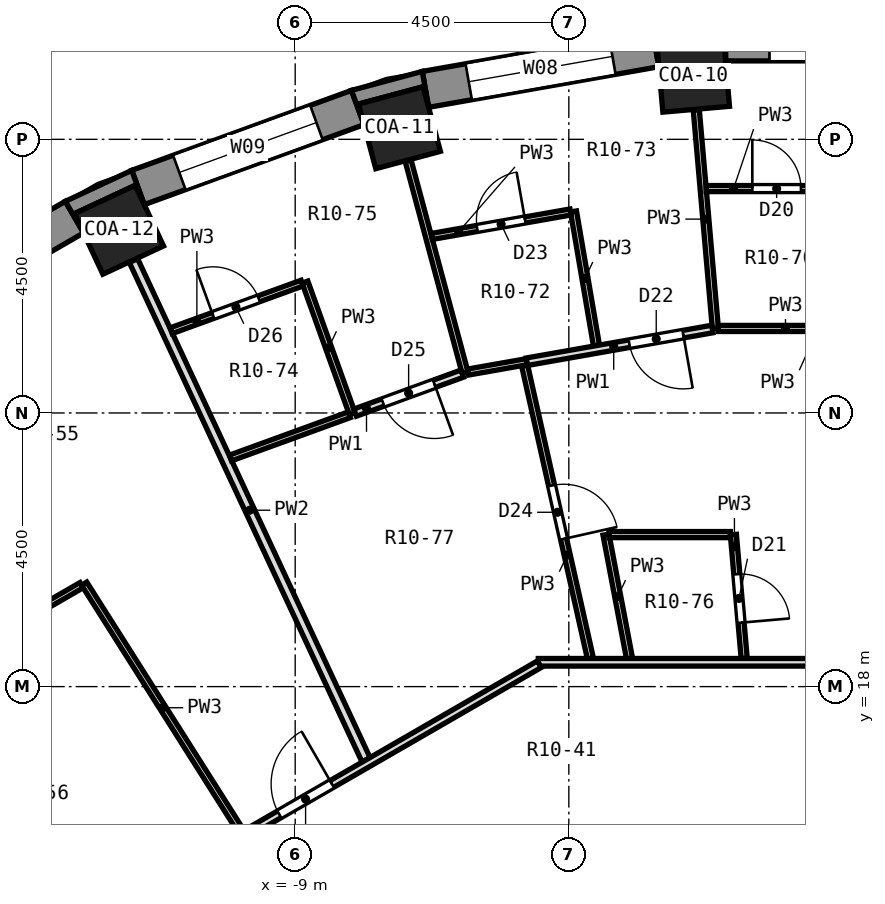
"""IFC4 building model, lengths in metres.
Left out: names, types, materials, properties, quantities, classifications, styles, units other than length and angle.
Written with IfcOpenShell. Run it as: python <this file> out.ifc"""

import sys

from ifc_helpers import new_model, si_unit, direction, frame, frame_2d, origin, origin_2d, place, context, subcontext, project, spatial, polyline, rectangle, outline, extrude, element, fill, save


model = new_model("IFC4")
c1 = context("Model", 3, precision=1e-05, world=origin(), true_north=direction((0.0, 1.0)))
c2 = subcontext(c1, "Body", "Model", "MODEL_VIEW")
j1 = project(units=[si_unit("LENGTHUNIT", "METRE"), si_unit("PLANEANGLEUNIT", "RADIAN")], contexts=[c1])
p1 = place(None, origin())
s1 = spatial("IfcSite", under=j1, at=p1, CompositionType="ELEMENT")
p2 = place(p1, origin())
s2 = spatial("IfcBuilding", under=s1, at=p2, CompositionType="ELEMENT")
p3 = place(p2, frame((0.0, 0.0, 36.2)))
s3 = spatial("IfcBuildingStorey", under=s2, at=p3, CompositionType="ELEMENT", Elevation=36.2)
for number, where, z_axis, x_axis in (
    (1, (-2.453, 28.043, 0.0), (0.0, 0.0, 1.0), (-0.087, 0.996, 0.0)),
    (2, (-7.286, 27.191, 0.0), (0.0, 0.0, 1.0), (-0.259, 0.966, 0.0)),
    (3, (-11.897, 25.512, 0.0), (0.0, 0.0, 1.0), (-0.423, 0.906, 0.0)),
):
    element("IfcColumn", number, at=place(p3, frame(where, z_axis=z_axis, x_axis=x_axis)), inside=s3, PredefinedType="COLUMN", context=c2, shape_type="SweptSolid", body=[
        extrude(rectangle(XDim=1.1, YDim=1.1, at=origin_2d()), origin(), (0.0, 0.0, 1.0), 3.3),
    ])
p4 = place(p3, frame((1.923, 28.59, 0.0), z_axis=(0.0, 0.0, 1.0), x_axis=(-1.0, 0.0, 0.0)))
e4 = element("IfcWall", 4, at=p4, inside=s3, PredefinedType="SOLIDWALL", context=c2, shape_type="SweptSolid", body=[
    extrude(rectangle(XDim=3.846, YDim=0.6, at=frame_2d((1.923, 0.0))), origin(), (0.0, 0.0, 1.0), 2.75),
])
p5 = place(p4, frame((0.723, 0.0, 0.9)))
e5 = element("IfcOpeningElement", 5, at=p5, cuts=e4, PredefinedType="OPENING", context=c2, shape_type="SweptSolid", body=[
    extrude(rectangle(XDim=2.4, YDim=1.8, at=frame_2d((1.2, 0.9))), frame((0.0, 0.312, 0.0), z_axis=(0.0, -1.0, 0.0), x_axis=(1.0, 0.0, 0.0)), (0.0, 0.0, 1.0), 0.624),
])
p6 = place(p3, frame((-3.071, 28.489, 0.0), z_axis=(0.0, 0.0, 1.0), x_axis=(-0.984800809218, -0.173687553279, 0.0)))
e6 = element("IfcWall", 6, at=p6, inside=s3, PredefinedType="SOLIDWALL", context=c2, shape_type="SweptSolid", body=[
    extrude(rectangle(XDim=3.846, YDim=0.6, at=frame_2d((1.923, 0.0))), origin(), (0.0, 0.0, 1.0), 2.75),
])
p7 = place(p6, frame((0.723, 0.0, 0.9)))
e7 = element("IfcOpeningElement", 7, at=p7, cuts=e6, PredefinedType="OPENING", context=c2, shape_type="SweptSolid", body=[
    extrude(rectangle(XDim=2.4, YDim=1.8, at=frame_2d((1.2, 0.9))), frame((0.0, 0.312, 0.0), z_axis=(0.0, -1.0, 0.0), x_axis=(1.0, 0.0, 0.0)), (0.0, 0.0, 1.0), 0.624),
])
p8 = place(p3, frame((-7.971, 27.523, 0.0), z_axis=(0.0, 0.0, 1.0), x_axis=(-0.939689588564, -0.342028474173, 0.0)))
e8 = element("IfcWall", 8, at=p8, inside=s3, PredefinedType="SOLIDWALL", context=c2, shape_type="SweptSolid", body=[
    extrude(rectangle(XDim=3.846, YDim=0.6, at=frame_2d((1.923, 0.0))), origin(), (0.0, 0.0, 1.0), 2.75),
])
p9 = place(p8, frame((0.723, 0.0, 0.9)))
e9 = element("IfcOpeningElement", 9, at=p9, cuts=e8, PredefinedType="OPENING", context=c2, shape_type="SweptSolid", body=[
    extrude(rectangle(XDim=2.4, YDim=1.8, at=frame_2d((1.2, 0.9))), frame((0.0, 0.312, 0.0), z_axis=(0.0, -1.0, 0.0), x_axis=(1.0, 0.0, 0.0)), (0.0, 0.0, 1.0), 0.624),
])
p10 = place(p3, frame((-12.63, 25.721, 0.0), z_axis=(0.0, 0.0, 1.0), x_axis=(-0.86603124159, -0.499989888488, 0.0)))
e10 = element("IfcWall", 10, at=p10, inside=s3, PredefinedType="SOLIDWALL", context=c2, shape_type="SweptSolid", body=[
    extrude(rectangle(XDim=3.846, YDim=0.6, at=frame_2d((1.923, 0.0))), origin(), (0.0, 0.0, 1.0), 2.75),
])
p11 = place(p10, frame((0.723, 0.0, 0.9)))
e11 = element("IfcOpeningElement", 11, at=p11, cuts=e10, PredefinedType="OPENING", context=c2, shape_type="SweptSolid", body=[
    extrude(rectangle(XDim=2.4, YDim=1.8, at=frame_2d((1.2, 0.9))), frame((0.0, 0.312, 0.0), z_axis=(0.0, -1.0, 0.0), x_axis=(1.0, 0.0, 0.0)), (0.0, 0.0, 1.0), 0.624),
])
p12 = place(p3, origin())
e12 = element("IfcWall", 12, at=p12, inside=s3, PredefinedType="SOLIDWALL", context=c2, shape_type="SweptSolid", body=[
    extrude(outline(polyline([(-1.923, 28.89), (-3.123, 28.785), (-3.019, 28.194), (-3.049, 28.543), (-1.954, 28.639), (-1.923, 28.29), (-1.923, 28.89)])), origin(), (0.0, 0.0, 1.0), 2.75),
])
p13 = place(p3, origin())
e13 = element("IfcWall", 13, at=p13, inside=s3, PredefinedType="SOLIDWALL", context=c2, shape_type="SweptSolid", body=[
    extrude(outline(polyline([(-6.91, 28.117), (-8.074, 27.805), (-7.869, 27.241), (-7.959, 27.58), (-6.897, 27.865), (-6.806, 27.526), (-6.91, 28.117)])), origin(), (0.0, 0.0, 1.0), 2.75),
])
p14 = place(p3, origin())
e14 = element("IfcWall", 14, at=p14, inside=s3, PredefinedType="SOLIDWALL", context=c2, shape_type="SweptSolid", body=[
    extrude(outline(polyline([(-12.78, 25.981), (-12.479, 25.461), (-12.628, 25.779), (-11.631, 26.243), (-11.483, 25.926), (-11.688, 26.49), (-12.78, 25.981)])), origin(), (0.0, 0.0, 1.0), 2.75),
])
p15 = place(p3, frame((-2.404, 27.485, 0.0), z_axis=(0.0, 0.0, 1.0), x_axis=(0.08706456859, -0.996202670593, 0.0)))
e15 = element("IfcWall", 15, at=p15, inside=s3, PredefinedType="PARTITIONING", context=c2, shape_type="SweptSolid", body=[
    extrude(rectangle(XDim=3.609, YDim=0.1, at=frame_2d((1.804, 0.0))), origin(), (0.0, 0.0, 1.0), 2.75),
])
p16 = place(p3, frame((-1.794, 20.5, 0.0), z_axis=(0.0, 0.0, 1.0), x_axis=(0.087005571392, -0.996207824978, 0.0)))
e16 = element("IfcWall", 16, at=p16, inside=s3, PredefinedType="PARTITIONING", context=c2, shape_type="SweptSolid", body=[
    extrude(rectangle(XDim=2.046, YDim=0.1, at=frame_2d((1.023, 0.0))), origin(), (0.0, 0.0, 1.0), 2.75),
])
p17 = place(p16, frame((0.654, 0.0, 0.0)))
e17 = element("IfcOpeningElement", 17, at=p17, cuts=e16, PredefinedType="OPENING", context=c2, shape_type="SweptSolid", body=[
    extrude(rectangle(XDim=0.8, YDim=2.1, at=frame_2d((0.4, 1.05))), frame((0.0, 0.062, 0.0), z_axis=(0.0, -1.0, 0.0), x_axis=(1.0, 0.0, 0.0)), (0.0, 0.0, 1.0), 0.124),
])
p18 = place(p3, frame((-4.423, 25.814, 0.0), z_axis=(0.0, 0.0, 1.0), x_axis=(0.168697286213, -0.985667908387, 0.0)))
e18 = element("IfcWall", 18, at=p18, inside=s3, PredefinedType="PARTITIONING", context=c2, shape_type="SweptSolid", body=[
    extrude(rectangle(XDim=2.237, YDim=0.1, at=frame_2d((1.119, 0.0))), origin(), (0.0, 0.0, 1.0), 2.75),
])
p19 = place(p3, frame((-3.889, 20.5, 0.0), z_axis=(0.0, 0.0, 1.0), x_axis=(0.186603866767, -0.982435238022, 0.0)))
e19 = element("IfcWall", 19, at=p19, inside=s3, PredefinedType="PARTITIONING", context=c2, shape_type="SweptSolid", body=[
    extrude(rectangle(XDim=2.075, YDim=0.1, at=frame_2d((1.038, 0.0))), origin(), (0.0, 0.0, 1.0), 2.75),
])
p20 = place(p3, frame((-5.228, 23.285, 0.0), z_axis=(0.0, 0.0, 1.0), x_axis=(0.219089188196, -0.975704836319, 0.0)))
e20 = element("IfcWall", 20, at=p20, inside=s3, PredefinedType="PARTITIONING", context=c2, shape_type="SweptSolid", body=[
    extrude(rectangle(XDim=4.944, YDim=0.1, at=frame_2d((2.472, 0.0))), origin(), (0.0, 0.0, 1.0), 2.75),
])
p21 = place(p20, frame((2.028, 0.0, 0.0)))
e21 = element("IfcOpeningElement", 21, at=p21, cuts=e20, PredefinedType="OPENING", context=c2, shape_type="SweptSolid", body=[
    extrude(rectangle(XDim=0.9, YDim=2.1, at=frame_2d((0.45, 1.05))), frame((0.0, 0.062, 0.0), z_axis=(0.0, -1.0, 0.0), x_axis=(1.0, 0.0, 0.0)), (0.0, 0.0, 1.0), 0.124),
])
p22 = place(p3, frame((-7.143, 26.649, 0.0), z_axis=(0.0, 0.0, 1.0), x_axis=(0.259371754041, -0.965777558864, 0.0)))
e22 = element("IfcWall", 22, at=p22, inside=s3, PredefinedType="PARTITIONING", context=c2, shape_type="SweptSolid", body=[
    extrude(rectangle(XDim=3.609, YDim=0.1, at=frame_2d((1.804, 0.0))), origin(), (0.0, 0.0, 1.0), 2.75),
])
p23 = place(p3, frame((-8.839, 24.653, 0.0), z_axis=(0.0, 0.0, 1.0), x_axis=(0.337828591949, -0.941207651085, 0.0)))
e23 = element("IfcWall", 23, at=p23, inside=s3, PredefinedType="PARTITIONING", context=c2, shape_type="SweptSolid", body=[
    extrude(rectangle(XDim=2.3, YDim=0.1, at=frame_2d((1.15, 0.0))), origin(), (0.0, 0.0, 1.0), 2.75),
])
p24 = place(p3, frame((-11.659, 25.006, 0.0), z_axis=(0.0, 0.0, 1.0), x_axis=(0.422264101424, -0.906472850475, 0.0)))
e24 = element("IfcWall", 24, at=p24, inside=s3, PredefinedType="PARTITIONING", context=c2, shape_type="SweptSolid", body=[
    extrude(rectangle(XDim=9.057, YDim=0.15, at=frame_2d((4.529, 0.0))), origin(), (0.0, 0.0, 1.0), 2.75),
])
p25 = place(p3, frame((-12.47, 19.693, 0.0), z_axis=(0.0, 0.0, 1.0), x_axis=(0.535000379435, -0.844851817779, 0.0)))
e25 = element("IfcWall", 25, at=p25, inside=s3, PredefinedType="PARTITIONING", context=c2, shape_type="SweptSolid", body=[
    extrude(rectangle(XDim=4.831, YDim=0.1, at=frame_2d((2.416, 0.0))), origin(), (0.0, 0.0, 1.0), 2.75),
])
p26 = place(p3, frame((-5.002, 18.4, 0.0), z_axis=(0.0, 0.0, 1.0), x_axis=(1.0, 0.0, 0.0)))
e26 = element("IfcWall", 26, at=p26, inside=s3, PredefinedType="PARTITIONING", context=c2, shape_type="SweptSolid", body=[
    extrude(rectangle(XDim=9.87, YDim=0.125, at=frame_2d((4.935, 0.0))), origin(), (0.0, 0.0, 1.0), 2.75),
])
p27 = place(p26, frame((6.162, 0.0, 0.0)))
e27 = element("IfcOpeningElement", 27, at=p27, cuts=e26, PredefinedType="OPENING", context=c2, shape_type="SweptSolid", body=[
    extrude(rectangle(XDim=1.0, YDim=2.1, at=frame_2d((0.5, 1.05))), frame((0.0, 0.074, 0.0), z_axis=(0.0, -1.0, 0.0), x_axis=(1.0, 0.0, 0.0)), (0.0, 0.0, 1.0), 0.149),
])
p28 = place(p3, frame((-3.839, 20.5, 0.0), z_axis=(0.0, 0.0, 1.0), x_axis=(1.0, 0.0, 0.0)))
e28 = element("IfcWall", 28, at=p28, inside=s3, PredefinedType="PARTITIONING", context=c2, shape_type="SweptSolid", body=[
    extrude(rectangle(XDim=1.995, YDim=0.1, at=frame_2d((0.998, 0.0))), origin(), (0.0, 0.0, 1.0), 2.75),
])
p29 = place(p3, frame((-2.04, 23.89, 0.0), z_axis=(0.0, 0.0, 1.0), x_axis=(1.0, 0.0, 0.0)))
e29 = element("IfcWall", 29, at=p29, inside=s3, PredefinedType="PARTITIONING", context=c2, shape_type="SweptSolid", body=[
    extrude(rectangle(XDim=2.205, YDim=0.1, at=frame_2d((1.103, 0.0))), origin(), (0.0, 0.0, 1.0), 2.75),
])
p30 = place(p3, frame((-2.241, 26.19, 0.0), z_axis=(0.0, 0.0, 1.0), x_axis=(1.0, 0.0, 0.0)))
e30 = element("IfcWall", 30, at=p30, inside=s3, PredefinedType="PARTITIONING", context=c2, shape_type="SweptSolid", body=[
    extrude(rectangle(XDim=2.367, YDim=0.1, at=frame_2d((1.184, 0.0))), origin(), (0.0, 0.0, 1.0), 2.75),
])
p31 = place(p30, frame((0.759, 0.0, 0.0)))
e31 = element("IfcOpeningElement", 31, at=p31, cuts=e30, PredefinedType="OPENING", context=c2, shape_type="SweptSolid", body=[
    extrude(rectangle(XDim=0.8, YDim=2.1, at=frame_2d((0.4, 1.05))), frame((0.0, 0.062, 0.0), z_axis=(0.0, -1.0, 0.0), x_axis=(1.0, 0.0, 0.0)), (0.0, 0.0, 1.0), 0.124),
])
p32 = place(p3, frame((-6.158, 23.173, 0.0), z_axis=(0.0, 0.0, 1.0), x_axis=(0.984806059991, 0.173657778994, 0.0)))
e32 = element("IfcWall", 32, at=p32, inside=s3, PredefinedType="PARTITIONING", context=c2, shape_type="SweptSolid", body=[
    extrude(rectangle(XDim=0.983, YDim=0.1, at=frame_2d((0.491, 0.0))), origin(), (0.0, 0.0, 1.0), 2.75),
])
p33 = place(p3, frame((-5.19, 23.343, 0.0), z_axis=(0.0, 0.0, 1.0), x_axis=(0.984810524367, 0.173632459798, 0.0)))
e33 = element("IfcWall", 33, at=p33, inside=s3, PredefinedType="PARTITIONING", context=c2, shape_type="SweptSolid", body=[
    extrude(rectangle(XDim=3.098, YDim=0.125, at=frame_2d((1.549, 0.0))), origin(), (0.0, 0.0, 1.0), 2.75),
])
p34 = place(p33, frame((1.71, 0.0, 0.0)))
e34 = element("IfcOpeningElement", 34, at=p34, cuts=e33, PredefinedType="OPENING", context=c2, shape_type="SweptSolid", body=[
    extrude(rectangle(XDim=0.9, YDim=2.1, at=frame_2d((0.45, 1.05))), frame((0.0, 0.074, 0.0), z_axis=(0.0, -1.0, 0.0), x_axis=(1.0, 0.0, 0.0)), (0.0, 0.0, 1.0), 0.149),
])
p35 = place(p3, frame((-6.755, 25.403, 0.0), z_axis=(0.0, 0.0, 1.0), x_axis=(0.984780377383, 0.173803361074, 0.0)))
e35 = element("IfcWall", 35, at=p35, inside=s3, PredefinedType="PARTITIONING", context=c2, shape_type="SweptSolid", body=[
    extrude(rectangle(XDim=2.318, YDim=0.1, at=frame_2d((1.159, 0.0))), origin(), (0.0, 0.0, 1.0), 2.75),
])
p36 = place(p35, frame((0.759, 0.0, 0.0)))
e36 = element("IfcOpeningElement", 36, at=p36, cuts=e35, PredefinedType="OPENING", context=c2, shape_type="SweptSolid", body=[
    extrude(rectangle(XDim=0.8, YDim=2.1, at=frame_2d((0.4, 1.05))), frame((0.0, 0.062, 0.0), z_axis=(0.0, -1.0, 0.0), x_axis=(1.0, 0.0, 0.0)), (0.0, 0.0, 1.0), 0.124),
])
p37 = place(p3, frame((-10.064, 21.76, 0.0), z_axis=(0.0, 0.0, 1.0), x_axis=(0.939769439446, 0.341809012, 0.0)))
e37 = element("IfcWall", 37, at=p37, inside=s3, PredefinedType="PARTITIONING", context=c2, shape_type="SweptSolid", body=[
    extrude(rectangle(XDim=2.081, YDim=0.1, at=frame_2d((1.04, 0.0))), origin(), (0.0, 0.0, 1.0), 2.75),
])
p38 = place(p3, frame((-8.015, 22.505, 0.0), z_axis=(0.0, 0.0, 1.0), x_axis=(0.939553626447, 0.342401785962, 0.0)))
e38 = element("IfcWall", 38, at=p38, inside=s3, PredefinedType="PARTITIONING", context=c2, shape_type="SweptSolid", body=[
    extrude(rectangle(XDim=1.875, YDim=0.125, at=frame_2d((0.937, 0.0))), origin(), (0.0, 0.0, 1.0), 2.75),
])
p39 = place(p38, frame((0.487, 0.0, 0.0)))
e39 = element("IfcOpeningElement", 39, at=p39, cuts=e38, PredefinedType="OPENING", context=c2, shape_type="SweptSolid", body=[
    extrude(rectangle(XDim=0.9, YDim=2.1, at=frame_2d((0.45, 1.05))), frame((0.0, 0.074, 0.0), z_axis=(0.0, -1.0, 0.0), x_axis=(1.0, 0.0, 0.0)), (0.0, 0.0, 1.0), 0.149),
])
p40 = place(p3, frame((-11.04, 23.853, 0.0), z_axis=(0.0, 0.0, 1.0), x_axis=(0.93974675699, 0.341871368686, 0.0)))
e40 = element("IfcWall", 40, at=p40, inside=s3, PredefinedType="PARTITIONING", context=c2, shape_type="SweptSolid", body=[
    extrude(rectangle(XDim=2.292, YDim=0.1, at=frame_2d((1.146, 0.0))), origin(), (0.0, 0.0, 1.0), 2.75),
])
p41 = place(p40, frame((0.733, 0.0, 0.0)))
e41 = element("IfcOpeningElement", 41, at=p41, cuts=e40, PredefinedType="OPENING", context=c2, shape_type="SweptSolid", body=[
    extrude(rectangle(XDim=0.8, YDim=2.1, at=frame_2d((0.4, 1.05))), frame((0.0, 0.062, 0.0), z_axis=(0.0, -1.0, 0.0), x_axis=(1.0, 0.0, 0.0)), (0.0, 0.0, 1.0), 0.124),
])
p42 = place(p3, frame((-13.532, 13.434, 0.0), z_axis=(0.0, 0.0, 1.0), x_axis=(0.86605048973, 0.49995654735, 0.0)))
e42 = element("IfcWall", 42, at=p42, inside=s3, PredefinedType="PARTITIONING", context=c2, shape_type="SweptSolid", body=[
    extrude(rectangle(XDim=9.871, YDim=0.125, at=frame_2d((4.935, 0.0))), origin(), (0.0, 0.0, 1.0), 2.75),
])
p43 = place(p42, frame((4.931, 0.0, 0.0)))
e43 = element("IfcOpeningElement", 43, at=p43, cuts=e42, PredefinedType="OPENING", context=c2, shape_type="SweptSolid", body=[
    extrude(rectangle(XDim=1.0, YDim=2.1, at=frame_2d((0.5, 1.05))), frame((0.0, 0.074, 0.0), z_axis=(0.0, -1.0, 0.0), x_axis=(1.0, 0.0, 0.0)), (0.0, 0.0, 1.0), 0.149),
])
p44 = place(p42, frame((1.711, 0.0, 0.0)))
e44 = element("IfcOpeningElement", 44, at=p44, cuts=e42, PredefinedType="OPENING", context=c2, shape_type="SweptSolid", body=[
    extrude(rectangle(XDim=0.9, YDim=2.1, at=frame_2d((0.45, 1.05))), frame((0.0, 0.074, 0.0), z_axis=(0.0, -1.0, 0.0), x_axis=(1.0, 0.0, 0.0)), (0.0, 0.0, 1.0), 0.149),
])
p45 = place(p3, frame((-13.453, 19.126, 0.0), z_axis=(0.0, 0.0, 1.0), x_axis=(0.866144373206, 0.499793882279, 0.0)))
e45 = element("IfcWall", 45, at=p45, inside=s3, PredefinedType="PARTITIONING", context=c2, shape_type="SweptSolid", body=[
    extrude(rectangle(XDim=1.085, YDim=0.1, at=frame_2d((0.542, 0.0))), origin(), (0.0, 0.0, 1.0), 2.75),
])
p46 = place(p5, origin())
e46 = element("IfcWindow", 46, at=p46, inside=s3, PartitioningType="SINGLE_PANEL", PredefinedType="WINDOW", context=c2, shape_type="SweptSolid", body=[
    extrude(rectangle(XDim=2.4, YDim=1.8, at=frame_2d((1.2, 0.9))), frame((0.0, 0.18, 0.0), z_axis=(0.0, -1.0, 0.0), x_axis=(1.0, 0.0, 0.0)), (0.0, 0.0, 1.0), 0.06),
])
fill(e5, e46)
p47 = place(p7, origin())
e47 = element("IfcWindow", 47, at=p47, inside=s3, PartitioningType="SINGLE_PANEL", PredefinedType="WINDOW", context=c2, shape_type="SweptSolid", body=[
    extrude(rectangle(XDim=2.4, YDim=1.8, at=frame_2d((1.2, 0.9))), frame((0.0, 0.18, 0.0), z_axis=(0.0, -1.0, 0.0), x_axis=(1.0, 0.0, 0.0)), (0.0, 0.0, 1.0), 0.06),
])
fill(e7, e47)
p48 = place(p9, origin())
e48 = element("IfcWindow", 48, at=p48, inside=s3, PartitioningType="SINGLE_PANEL", PredefinedType="WINDOW", context=c2, shape_type="SweptSolid", body=[
    extrude(rectangle(XDim=2.4, YDim=1.8, at=frame_2d((1.2, 0.9))), frame((0.0, 0.18, 0.0), z_axis=(0.0, -1.0, 0.0), x_axis=(1.0, 0.0, 0.0)), (0.0, 0.0, 1.0), 0.06),
])
fill(e9, e48)
p49 = place(p31, origin())
e49 = element("IfcDoor", 49, at=p49, inside=s3, OperationType="SINGLE_SWING_LEFT", PredefinedType="DOOR", context=c2, shape_type="SweptSolid", body=[
    extrude(rectangle(XDim=0.8, YDim=2.1, at=frame_2d((0.4, 1.05))), frame((0.0, 0.025, 0.0), z_axis=(0.0, -1.0, 0.0), x_axis=(1.0, 0.0, 0.0)), (0.0, 0.0, 1.0), 0.05),
])
fill(e31, e49)
p50 = place(p17, origin())
e50 = element("IfcDoor", 50, at=p50, inside=s3, OperationType="SINGLE_SWING_RIGHT", PredefinedType="DOOR", context=c2, shape_type="SweptSolid", body=[
    extrude(rectangle(XDim=0.8, YDim=2.1, at=frame_2d((0.4, 1.05))), frame((0.0, 0.025, 0.0), z_axis=(0.0, -1.0, 0.0), x_axis=(1.0, 0.0, 0.0)), (0.0, 0.0, 1.0), 0.05),
])
fill(e17, e50)
p51 = place(p34, frame((0.9, 0.0, 0.0), z_axis=(0.0, 0.0, 1.0), x_axis=(-1.0, 0.0, 0.0)))
e51 = element("IfcDoor", 51, at=p51, inside=s3, OperationType="SINGLE_SWING_LEFT", PredefinedType="DOOR", context=c2, shape_type="SweptSolid", body=[
    extrude(rectangle(XDim=0.9, YDim=2.1, at=frame_2d((0.45, 1.05))), frame((0.0, 0.025, 0.0), z_axis=(0.0, -1.0, 0.0), x_axis=(1.0, 0.0, 0.0)), (0.0, 0.0, 1.0), 0.05),
])
fill(e34, e51)
p52 = place(p36, origin())
e52 = element("IfcDoor", 52, at=p52, inside=s3, OperationType="SINGLE_SWING_RIGHT", PredefinedType="DOOR", context=c2, shape_type="SweptSolid", body=[
    extrude(rectangle(XDim=0.8, YDim=2.1, at=frame_2d((0.4, 1.05))), frame((0.0, 0.025, 0.0), z_axis=(0.0, -1.0, 0.0), x_axis=(1.0, 0.0, 0.0)), (0.0, 0.0, 1.0), 0.05),
])
fill(e36, e52)
p53 = place(p21, origin())
e53 = element("IfcDoor", 53, at=p53, inside=s3, OperationType="SINGLE_SWING_RIGHT", PredefinedType="DOOR", context=c2, shape_type="SweptSolid", body=[
    extrude(rectangle(XDim=0.9, YDim=2.1, at=frame_2d((0.45, 1.05))), frame((0.0, 0.025, 0.0), z_axis=(0.0, -1.0, 0.0), x_axis=(1.0, 0.0, 0.0)), (0.0, 0.0, 1.0), 0.05),
])
fill(e21, e53)
p54 = place(p39, frame((0.9, 0.0, 0.0), z_axis=(0.0, 0.0, 1.0), x_axis=(-1.0, 0.0, 0.0)))
e54 = element("IfcDoor", 54, at=p54, inside=s3, OperationType="SINGLE_SWING_LEFT", PredefinedType="DOOR", context=c2, shape_type="SweptSolid", body=[
    extrude(rectangle(XDim=0.9, YDim=2.1, at=frame_2d((0.45, 1.05))), frame((0.0, 0.025, 0.0), z_axis=(0.0, -1.0, 0.0), x_axis=(1.0, 0.0, 0.0)), (0.0, 0.0, 1.0), 0.05),
])
fill(e39, e54)
p55 = place(p41, origin())
e55 = element("IfcDoor", 55, at=p55, inside=s3, OperationType="SINGLE_SWING_LEFT", PredefinedType="DOOR", context=c2, shape_type="SweptSolid", body=[
    extrude(rectangle(XDim=0.8, YDim=2.1, at=frame_2d((0.4, 1.05))), frame((0.0, 0.025, 0.0), z_axis=(0.0, -1.0, 0.0), x_axis=(1.0, 0.0, 0.0)), (0.0, 0.0, 1.0), 0.05),
])
fill(e41, e55)
p56 = place(p43, origin())
e56 = element("IfcDoor", 56, at=p56, inside=s3, OperationType="SINGLE_SWING_RIGHT", PredefinedType="DOOR", context=c2, shape_type="SweptSolid", body=[
    extrude(rectangle(XDim=1.0, YDim=2.1, at=frame_2d((0.5, 1.05))), frame((0.0, 0.025, 0.0), z_axis=(0.0, -1.0, 0.0), x_axis=(1.0, 0.0, 0.0)), (0.0, 0.0, 1.0), 0.05),
])
fill(e43, e56)
save(model, sys.argv[1])
